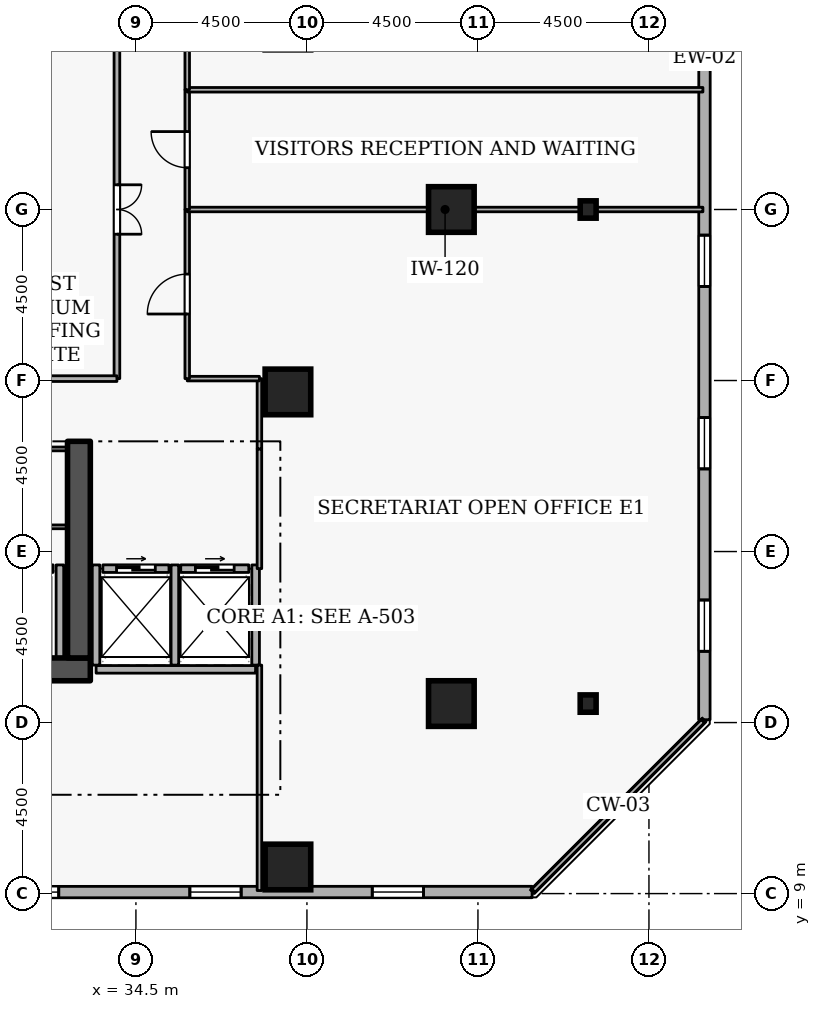
"""IFC4 building model, lengths in metres.
Left out: names, types, materials, properties, quantities, classifications, styles, units other than length and angle.
Written with IfcOpenShell. Run it as: python <this file> out.ifc"""

import sys

from ifc_helpers import new_model, si_unit, direction, frame, frame_2d, origin, origin_2d, place, context, subcontext, project, spatial, rectangle, i_section, extrude, element, fill, save


model = new_model("IFC4")
c1 = context("Model", 3, precision=1e-05, world=origin(), true_north=direction((0.0, 1.0)))
c2 = subcontext(c1, "Body", "Model", "MODEL_VIEW")
j1 = project(units=[si_unit("LENGTHUNIT", "METRE"), si_unit("PLANEANGLEUNIT", "RADIAN")], contexts=[c1])
p1 = place(None, origin())
s1 = spatial("IfcSite", under=j1, at=p1, CompositionType="ELEMENT")
p2 = place(p1, origin())
s2 = spatial("IfcBuilding", under=s1, at=p2, CompositionType="ELEMENT")
p3 = place(p2, frame((0.0, 0.0, 94.5)))
s3 = spatial("IfcBuildingStorey", under=s2, at=p3, CompositionType="ELEMENT", Elevation=94.5)
p4 = place(p3, frame((17.7, 14.9, 0.0), z_axis=(0.0, 0.0, 1.0), x_axis=(1.0, 0.0, 0.0)))
e1 = element("IfcWall", 1, at=p4, inside=s3, PredefinedType="SHEAR", context=c2, shape_type="SweptSolid", body=[
    extrude(rectangle(XDim=15.6, YDim=0.6, at=frame_2d((7.8, 0.0))), origin(), (0.0, 0.0, 1.0), 3.6),
])
p5 = place(p3, frame((33.0, 15.2, 0.0), z_axis=(0.0, 0.0, 1.0), x_axis=(0.0, 1.0, 0.0)))
e2 = element("IfcWall", 2, at=p5, inside=s3, PredefinedType="SHEAR", context=c2, shape_type="SweptSolid", body=[
    extrude(rectangle(XDim=5.7, YDim=0.6, at=frame_2d((2.85, 0.0))), origin(), (0.0, 0.0, 1.0), 3.6),
])
for number, where, z_axis, x_axis in (
    (3, (38.5, 9.7, 0.0), (0.0, 0.0, 1.0), (1.0, 0.0, 0.0)),
    (4, (42.8, 14.0, 0.0), (0.0, 0.0, 1.0), (1.0, 0.0, 0.0)),
    (5, (42.8, 27.0, 0.0), (0.0, 0.0, 1.0), (1.0, 0.0, 0.0)),
    (6, (38.5, 22.2, 0.0), (0.0, 0.0, 1.0), (1.0, 0.0, 0.0)),
):
    element("IfcColumn", number, at=place(p3, frame(where, z_axis=z_axis, x_axis=x_axis)), inside=s3, PredefinedType="COLUMN", context=c2, shape_type="SweptSolid", body=[
        extrude(rectangle(XDim=1.2, YDim=1.2, at=origin_2d()), origin(), (0.0, 0.0, 1.0), 3.6),
    ])
for number, where, z_axis, x_axis in (
    (7, (46.4, 14.0, 0.0), (0.0, 0.0, 1.0), (1.0, 0.0, 0.0)),
    (8, (46.4, 27.0, 0.0), (0.0, 0.0, 1.0), (1.0, 0.0, 0.0)),
):
    element("IfcColumn", number, at=place(p3, frame(where, z_axis=z_axis, x_axis=x_axis)), inside=s3, PredefinedType="COLUMN", context=c2, shape_type="SweptSolid", body=[
        extrude(i_section(OverallWidth=0.418, OverallDepth=0.456, WebThickness=0.042, FlangeThickness=0.067, FilletRadius=0.015, at=origin_2d()), origin(), (0.0, 0.0, 1.0), 3.6),
    ])
p6 = place(p3, frame((10.119, 9.035, 0.0), z_axis=(0.0, 0.0, 1.0), x_axis=(0.999999983371, 0.000182370391, 0.0)))
e9 = element("IfcWall", 9, at=p6, inside=s3, PredefinedType="STANDARD", context=c2, shape_type="SweptSolid", body=[
    extrude(rectangle(XDim=34.806, YDim=0.3, at=frame_2d((17.403, 0.0))), origin(), (0.0, 0.0, 1.0), 2.22),
])
p7 = place(p6, frame((6.6, 0.0, 0.72)))
e10 = element("IfcOpeningElement", 10, at=p7, cuts=e9, PredefinedType="OPENING", context=c2, shape_type="SweptSolid", body=[
    extrude(rectangle(XDim=1.35, YDim=1.05, at=frame_2d((0.675, 0.525))), frame((0.0, 0.16, 0.0), z_axis=(0.0, -1.0, 0.0), x_axis=(1.0, 0.0, 0.0)), (0.0, 0.0, 1.0), 0.32),
])
p8 = place(p6, frame((11.4, 0.0, 0.72)))
e11 = element("IfcOpeningElement", 11, at=p8, cuts=e9, PredefinedType="OPENING", context=c2, shape_type="SweptSolid", body=[
    extrude(rectangle(XDim=1.35, YDim=1.05, at=frame_2d((0.675, 0.525))), frame((0.0, 0.16, 0.0), z_axis=(0.0, -1.0, 0.0), x_axis=(1.0, 0.0, 0.0)), (0.0, 0.0, 1.0), 0.32),
])
p9 = place(p6, frame((21.0, 0.0, 0.72)))
e12 = element("IfcOpeningElement", 12, at=p9, cuts=e9, PredefinedType="OPENING", context=c2, shape_type="SweptSolid", body=[
    extrude(rectangle(XDim=1.35, YDim=1.05, at=frame_2d((0.675, 0.525))), frame((0.0, 0.16, 0.0), z_axis=(0.0, -1.0, 0.0), x_axis=(1.0, 0.0, 0.0)), (0.0, 0.0, 1.0), 0.32),
])
p10 = place(p6, frame((25.8, 0.0, 0.72)))
e13 = element("IfcOpeningElement", 13, at=p10, cuts=e9, PredefinedType="OPENING", context=c2, shape_type="SweptSolid", body=[
    extrude(rectangle(XDim=1.35, YDim=1.05, at=frame_2d((0.675, 0.525))), frame((0.0, 0.16, 0.0), z_axis=(0.0, -1.0, 0.0), x_axis=(1.0, 0.0, 0.0)), (0.0, 0.0, 1.0), 0.32),
])
p11 = place(p6, frame((30.6, 0.0, 0.72)))
e14 = element("IfcOpeningElement", 14, at=p11, cuts=e9, PredefinedType="OPENING", context=c2, shape_type="SweptSolid", body=[
    extrude(rectangle(XDim=1.35, YDim=1.05, at=frame_2d((0.675, 0.525))), frame((0.0, 0.16, 0.0), z_axis=(0.0, -1.0, 0.0), x_axis=(1.0, 0.0, 0.0)), (0.0, 0.0, 1.0), 0.32),
])
p12 = place(p3, frame((49.458, 13.575, 0.0), z_axis=(0.0, 0.0, 1.0), x_axis=(0.000182370391, 0.999999983371, 0.0)))
e15 = element("IfcWall", 15, at=p12, inside=s3, PredefinedType="STANDARD", context=c2, shape_type="SweptSolid", body=[
    extrude(rectangle(XDim=34.806, YDim=0.3, at=frame_2d((17.403, 0.0))), origin(), (0.0, 0.0, 1.0), 2.22),
])
p13 = place(p12, frame((1.8, 0.0, 0.72)))
e16 = element("IfcOpeningElement", 16, at=p13, cuts=e15, PredefinedType="OPENING", context=c2, shape_type="SweptSolid", body=[
    extrude(rectangle(XDim=1.35, YDim=1.05, at=frame_2d((0.675, 0.525))), frame((0.0, 0.16, 0.0), z_axis=(0.0, -1.0, 0.0), x_axis=(1.0, 0.0, 0.0)), (0.0, 0.0, 1.0), 0.32),
])
p14 = place(p12, frame((6.6, 0.0, 0.72)))
e17 = element("IfcOpeningElement", 17, at=p14, cuts=e15, PredefinedType="OPENING", context=c2, shape_type="SweptSolid", body=[
    extrude(rectangle(XDim=1.35, YDim=1.05, at=frame_2d((0.675, 0.525))), frame((0.0, 0.16, 0.0), z_axis=(0.0, -1.0, 0.0), x_axis=(1.0, 0.0, 0.0)), (0.0, 0.0, 1.0), 0.32),
])
p15 = place(p12, frame((11.4, 0.0, 0.72)))
e18 = element("IfcOpeningElement", 18, at=p15, cuts=e15, PredefinedType="OPENING", context=c2, shape_type="SweptSolid", body=[
    extrude(rectangle(XDim=1.35, YDim=1.05, at=frame_2d((0.675, 0.525))), frame((0.0, 0.16, 0.0), z_axis=(0.0, -1.0, 0.0), x_axis=(1.0, 0.0, 0.0)), (0.0, 0.0, 1.0), 0.32),
])
p16 = place(p12, frame((21.0, 0.0, 0.72)))
e19 = element("IfcOpeningElement", 19, at=p16, cuts=e15, PredefinedType="OPENING", context=c2, shape_type="SweptSolid", body=[
    extrude(rectangle(XDim=1.35, YDim=1.05, at=frame_2d((0.675, 0.525))), frame((0.0, 0.16, 0.0), z_axis=(0.0, -1.0, 0.0), x_axis=(1.0, 0.0, 0.0)), (0.0, 0.0, 1.0), 0.32),
])
p17 = place(p12, frame((25.8, 0.0, 0.72)))
e20 = element("IfcOpeningElement", 20, at=p17, cuts=e15, PredefinedType="OPENING", context=c2, shape_type="SweptSolid", body=[
    extrude(rectangle(XDim=1.35, YDim=1.05, at=frame_2d((0.675, 0.525))), frame((0.0, 0.16, 0.0), z_axis=(0.0, -1.0, 0.0), x_axis=(1.0, 0.0, 0.0)), (0.0, 0.0, 1.0), 0.32),
])
p18 = place(p12, frame((30.6, 0.0, 0.72)))
e21 = element("IfcOpeningElement", 21, at=p18, cuts=e15, PredefinedType="OPENING", context=c2, shape_type="SweptSolid", body=[
    extrude(rectangle(XDim=1.35, YDim=1.05, at=frame_2d((0.675, 0.525))), frame((0.0, 0.16, 0.0), z_axis=(0.0, -1.0, 0.0), x_axis=(1.0, 0.0, 0.0)), (0.0, 0.0, 1.0), 0.32),
])
p19 = place(p3, frame((30.43, 17.55, 0.0), z_axis=(0.0, 0.0, 1.0), x_axis=(1.0, 0.0, 0.0)))
e22 = element("IfcWall", 22, at=p19, inside=s3, PredefinedType="STANDARD", context=c2, shape_type="SweptSolid", body=[
    extrude(rectangle(XDim=1.89, YDim=0.2, at=frame_2d((0.945, 0.0))), origin(), (0.0, 0.0, 1.0), 3.3),
])
p20 = place(p19, frame((0.435, 0.0, 0.0)))
e23 = element("IfcOpeningElement", 23, at=p20, cuts=e22, PredefinedType="OPENING", context=c2, shape_type="SweptSolid", body=[
    extrude(rectangle(XDim=1.02, YDim=2.06, at=frame_2d((0.51, 1.03))), frame((0.0, 0.11, 0.0), z_axis=(0.0, -1.0, 0.0), x_axis=(1.0, 0.0, 0.0)), (0.0, 0.0, 1.0), 0.22),
])
p21 = place(p3, frame((33.63, 17.55, 0.0), z_axis=(0.0, 0.0, 1.0), x_axis=(1.0, 0.0, 0.0)))
e24 = element("IfcWall", 24, at=p21, inside=s3, PredefinedType="STANDARD", context=c2, shape_type="SweptSolid", body=[
    extrude(rectangle(XDim=1.74, YDim=0.2, at=frame_2d((0.87, 0.0))), origin(), (0.0, 0.0, 1.0), 3.3),
])
p22 = place(p21, frame((0.36, 0.0, 0.0)))
e25 = element("IfcOpeningElement", 25, at=p22, cuts=e24, PredefinedType="OPENING", context=c2, shape_type="SweptSolid", body=[
    extrude(rectangle(XDim=1.02, YDim=2.06, at=frame_2d((0.51, 1.03))), frame((0.0, 0.11, 0.0), z_axis=(0.0, -1.0, 0.0), x_axis=(1.0, 0.0, 0.0)), (0.0, 0.0, 1.0), 0.22),
])
p23 = place(p3, frame((35.68, 17.55, 0.0), z_axis=(0.0, 0.0, 1.0), x_axis=(1.0, 0.0, 0.0)))
e26 = element("IfcWall", 26, at=p23, inside=s3, PredefinedType="STANDARD", context=c2, shape_type="SweptSolid", body=[
    extrude(rectangle(XDim=1.79, YDim=0.2, at=frame_2d((0.895, 0.0))), origin(), (0.0, 0.0, 1.0), 3.3),
])
p24 = place(p23, frame((0.385, 0.0, 0.0)))
e27 = element("IfcOpeningElement", 27, at=p24, cuts=e26, PredefinedType="OPENING", context=c2, shape_type="SweptSolid", body=[
    extrude(rectangle(XDim=1.02, YDim=2.06, at=frame_2d((0.51, 1.03))), frame((0.0, 0.11, 0.0), z_axis=(0.0, -1.0, 0.0), x_axis=(1.0, 0.0, 0.0)), (0.0, 0.0, 1.0), 0.22),
])
p25 = place(p3, frame((32.5, 15.212, 0.0), z_axis=(0.0, 0.0, 1.0), x_axis=(0.0, 1.0, 0.0)))
e28 = element("IfcWall", 28, at=p25, inside=s3, PredefinedType="STANDARD", context=c2, shape_type="SweptSolid", body=[
    extrude(rectangle(XDim=2.436, YDim=0.2, at=frame_2d((1.218, 0.0))), origin(), (0.0, 0.0, 1.0), 3.3),
])
p26 = place(p3, frame((33.452, 14.9, 0.0), z_axis=(0.0, 0.0, 1.0), x_axis=(1.0, 0.0, 0.0)))
e29 = element("IfcWall", 29, at=p26, inside=s3, PredefinedType="STANDARD", context=c2, shape_type="SweptSolid", body=[
    extrude(rectangle(XDim=4.196, YDim=0.2, at=frame_2d((2.098, 0.0))), origin(), (0.0, 0.0, 1.0), 3.3),
])
for number, where, z_axis, x_axis in (
    (30, (35.525, 15.012, 0.0), (0.0, 0.0, 1.0), (0.0, 1.0, 0.0)),
    (31, (33.45, 15.012, 0.0), (0.0, 0.0, 1.0), (0.0, 1.0, 0.0)),
    (32, (37.65, 15.012, 0.0), (0.0, 0.0, 1.0), (0.0, 1.0, 0.0)),
):
    element("IfcWall", number, at=place(p3, frame(where, z_axis=z_axis, x_axis=x_axis)), inside=s3, PredefinedType="STANDARD", context=c2, shape_type="SweptSolid", body=[
        extrude(rectangle(XDim=2.636, YDim=0.2, at=frame_2d((1.318, 0.0))), origin(), (0.0, 0.0, 1.0), 3.3),
    ])
p27 = place(p3, frame((32.7, 18.65, 0.0), z_axis=(0.0, 0.0, 1.0), x_axis=(-1.0, 0.0, 0.0)))
e33 = element("IfcWall", 33, at=p27, inside=s3, PredefinedType="PARTITIONING", context=c2, shape_type="SweptSolid", body=[
    extrude(rectangle(XDim=2.15, YDim=0.1, at=frame_2d((1.075, 0.0))), origin(), (0.0, 0.0, 1.0), 3.3),
])
p28 = place(p3, frame((30.55, 20.7, 0.0), z_axis=(0.0, 0.0, 1.0), x_axis=(1.0, 0.0, 0.0)))
e34 = element("IfcWall", 34, at=p28, inside=s3, PredefinedType="PARTITIONING", context=c2, shape_type="SweptSolid", body=[
    extrude(rectangle(XDim=2.15, YDim=0.1, at=frame_2d((1.075, 0.0))), origin(), (0.0, 0.0, 1.0), 3.3),
])
p29 = place(p28, frame((0.6, 0.0, 0.0)))
e35 = element("IfcOpeningElement", 35, at=p29, cuts=e34, PredefinedType="OPENING", context=c2, shape_type="SweptSolid", body=[
    extrude(rectangle(XDim=0.95, YDim=2.1, at=frame_2d((0.475, 1.05))), frame((0.0, 0.06, 0.0), z_axis=(0.0, -1.0, 0.0), x_axis=(1.0, 0.0, 0.0)), (0.0, 0.0, 1.0), 0.12),
])
p30 = place(p3, frame((37.75, 17.55, 0.0), z_axis=(0.0, 0.0, 1.0), x_axis=(0.0, 1.0, 0.0)))
e36 = element("IfcWall", 36, at=p30, inside=s3, PredefinedType="PARTITIONING", context=c2, shape_type="SweptSolid", body=[
    extrude(rectangle(XDim=3.15, YDim=0.12, at=frame_2d((1.575, 0.0))), origin(), (0.0, 0.0, 1.0), 3.3),
])
p31 = place(p3, frame((37.75, 20.7, 0.0), z_axis=(0.0, 0.0, 1.0), x_axis=(0.0, 1.0, 0.0)))
e37 = element("IfcWall", 37, at=p31, inside=s3, PredefinedType="PARTITIONING", context=c2, shape_type="SweptSolid", body=[
    extrude(rectangle(XDim=1.85, YDim=0.12, at=frame_2d((0.925, 0.0))), origin(), (0.0, 0.0, 1.0), 3.3),
])
p32 = place(p3, frame((37.75, 22.55, 0.0), z_axis=(0.0, 0.0, 1.0), x_axis=(-1.0, 0.0, 0.0)))
e38 = element("IfcWall", 38, at=p32, inside=s3, PredefinedType="PARTITIONING", context=c2, shape_type="SweptSolid", body=[
    extrude(rectangle(XDim=1.9, YDim=0.12, at=frame_2d((0.95, 0.0))), origin(), (0.0, 0.0, 1.0), 3.3),
])
p33 = place(p3, frame((35.85, 22.55, 0.0), z_axis=(0.0, 0.0, 1.0), x_axis=(0.0, 1.0, 0.0)))
e39 = element("IfcWall", 39, at=p33, inside=s3, PredefinedType="PARTITIONING", context=c2, shape_type="SweptSolid", body=[
    extrude(rectangle(XDim=4.45, YDim=0.12, at=frame_2d((2.225, 0.0))), origin(), (0.0, 0.0, 1.0), 3.3),
])
p34 = place(p33, frame((1.7, 0.0, 0.0)))
e40 = element("IfcOpeningElement", 40, at=p34, cuts=e39, PredefinedType="OPENING", context=c2, shape_type="SweptSolid", body=[
    extrude(rectangle(XDim=1.05, YDim=2.1, at=frame_2d((0.525, 1.05))), frame((0.0, 0.07, 0.0), z_axis=(0.0, -1.0, 0.0), x_axis=(1.0, 0.0, 0.0)), (0.0, 0.0, 1.0), 0.14),
])
p35 = place(p3, frame((35.85, 27.0, 0.0), z_axis=(0.0, 0.0, 1.0), x_axis=(1.0, 0.0, 0.0)))
e41 = element("IfcWall", 41, at=p35, inside=s3, PredefinedType="PARTITIONING", context=c2, shape_type="SweptSolid", body=[
    extrude(rectangle(XDim=13.57, YDim=0.12, at=frame_2d((6.785, 0.0))), origin(), (0.0, 0.0, 1.0), 2.892),
])
p36 = place(p3, frame((49.42, 13.539, 0.0), z_axis=(0.0, 0.0, 1.0), x_axis=(-0.707106781187, -0.707106781187, 0.0)))
e42 = element("IfcWall", 42, at=p36, inside=s3, PredefinedType="PARTITIONING", context=c2, shape_type="SweptSolid", body=[
    extrude(rectangle(XDim=6.305, YDim=0.12, at=frame_2d((3.153, 0.0))), origin(), (0.0, 0.0, 1.0), 3.3),
])
p37 = place(p3, frame((37.75, 9.08, 0.0), z_axis=(0.0, 0.0, 1.0), x_axis=(0.0, 1.0, 0.0)))
e43 = element("IfcWall", 43, at=p37, inside=s3, PredefinedType="PARTITIONING", context=c2, shape_type="SweptSolid", body=[
    extrude(rectangle(XDim=5.932, YDim=0.12, at=frame_2d((2.966, 0.0))), origin(), (0.0, 0.0, 1.0), 3.3),
])
p38 = place(p3, frame((35.85, 27.0, 0.0), z_axis=(0.0, 0.0, 1.0), x_axis=(0.0, 1.0, 0.0)))
e44 = element("IfcWall", 44, at=p38, inside=s3, PredefinedType="PARTITIONING", context=c2, shape_type="SweptSolid", body=[
    extrude(rectangle(XDim=3.15, YDim=0.12, at=frame_2d((1.575, 0.0))), origin(), (0.0, 0.0, 1.0), 3.3),
])
p39 = place(p38, frame((1.1, 0.0, 0.0)))
e45 = element("IfcOpeningElement", 45, at=p39, cuts=e44, PredefinedType="OPENING", context=c2, shape_type="SweptSolid", body=[
    extrude(rectangle(XDim=0.95, YDim=2.1, at=frame_2d((0.475, 1.05))), frame((0.0, 0.07, 0.0), z_axis=(0.0, -1.0, 0.0), x_axis=(1.0, 0.0, 0.0)), (0.0, 0.0, 1.0), 0.14),
])
p40 = place(p3, frame((35.85, 30.15, 0.0), z_axis=(0.0, 0.0, 1.0), x_axis=(1.0, 0.0, 0.0)))
e46 = element("IfcWall", 46, at=p40, inside=s3, PredefinedType="PARTITIONING", context=c2, shape_type="SweptSolid", body=[
    extrude(rectangle(XDim=13.57, YDim=0.12, at=frame_2d((6.785, 0.0))), origin(), (0.0, 0.0, 1.0), 3.3),
])
p41 = place(p3, frame((35.85, 30.15, 0.0), z_axis=(0.0, 0.0, 1.0), x_axis=(0.0, 1.0, 0.0)))
e47 = element("IfcWall", 47, at=p41, inside=s3, PredefinedType="PARTITIONING", context=c2, shape_type="SweptSolid", body=[
    extrude(rectangle(XDim=1.3, YDim=0.12, at=frame_2d((0.65, 0.0))), origin(), (0.0, 0.0, 1.0), 3.3),
])
p42 = place(p3, frame((34.0, 31.45, 0.0), z_axis=(0.0, 0.0, 1.0), x_axis=(0.0, -1.0, 0.0)))
e48 = element("IfcWall", 48, at=p42, inside=s3, PredefinedType="PARTITIONING", context=c2, shape_type="SweptSolid", body=[
    extrude(rectangle(XDim=8.9, YDim=0.15, at=frame_2d((4.45, 0.0))), origin(), (0.0, 0.0, 1.0), 3.3),
])
p43 = place(p42, frame((3.8, 0.0, 0.0)))
e49 = element("IfcOpeningElement", 49, at=p43, cuts=e48, PredefinedType="OPENING", context=c2, shape_type="SweptSolid", body=[
    extrude(rectangle(XDim=1.3, YDim=2.12, at=frame_2d((0.65, 1.06))), frame((0.0, 0.085, 0.0), z_axis=(0.0, -1.0, 0.0), x_axis=(1.0, 0.0, 0.0)), (0.0, 0.0, 1.0), 0.17),
])
p44 = place(p3, frame((34.0, 22.55, 0.0), z_axis=(0.0, 0.0, 1.0), x_axis=(-1.0, 0.0, 0.0)))
e50 = element("IfcWall", 50, at=p44, inside=s3, PredefinedType="PARTITIONING", context=c2, shape_type="SweptSolid", body=[
    extrude(rectangle(XDim=3.3, YDim=0.15, at=frame_2d((1.65, 0.0))), origin(), (0.0, 0.0, 1.0), 3.3),
])
p45 = place(p9, origin())
e51 = element("IfcWindow", 51, at=p45, inside=s3, PartitioningType="SINGLE_PANEL", PredefinedType="WINDOW", context=c2, shape_type="SweptSolid", body=[
    extrude(rectangle(XDim=1.35, YDim=1.05, at=frame_2d((0.675, 0.525))), frame((0.0, 0.03, 0.0), z_axis=(0.0, -1.0, 0.0), x_axis=(1.0, 0.0, 0.0)), (0.0, 0.0, 1.0), 0.06),
])
fill(e12, e51)
p46 = place(p10, origin())
e52 = element("IfcWindow", 52, at=p46, inside=s3, PartitioningType="SINGLE_PANEL", PredefinedType="WINDOW", context=c2, shape_type="SweptSolid", body=[
    extrude(rectangle(XDim=1.35, YDim=1.05, at=frame_2d((0.675, 0.525))), frame((0.0, 0.03, 0.0), z_axis=(0.0, -1.0, 0.0), x_axis=(1.0, 0.0, 0.0)), (0.0, 0.0, 1.0), 0.06),
])
fill(e13, e52)
p47 = place(p11, origin())
e53 = element("IfcWindow", 53, at=p47, inside=s3, PartitioningType="SINGLE_PANEL", PredefinedType="WINDOW", context=c2, shape_type="SweptSolid", body=[
    extrude(rectangle(XDim=1.35, YDim=1.05, at=frame_2d((0.675, 0.525))), frame((0.0, 0.03, 0.0), z_axis=(0.0, -1.0, 0.0), x_axis=(1.0, 0.0, 0.0)), (0.0, 0.0, 1.0), 0.06),
])
fill(e14, e53)
p48 = place(p13, origin())
e54 = element("IfcWindow", 54, at=p48, inside=s3, PartitioningType="SINGLE_PANEL", PredefinedType="WINDOW", context=c2, shape_type="SweptSolid", body=[
    extrude(rectangle(XDim=1.35, YDim=1.05, at=frame_2d((0.675, 0.525))), frame((0.0, 0.03, 0.0), z_axis=(0.0, -1.0, 0.0), x_axis=(1.0, 0.0, 0.0)), (0.0, 0.0, 1.0), 0.06),
])
fill(e16, e54)
p49 = place(p14, origin())
e55 = element("IfcWindow", 55, at=p49, inside=s3, PartitioningType="SINGLE_PANEL", PredefinedType="WINDOW", context=c2, shape_type="SweptSolid", body=[
    extrude(rectangle(XDim=1.35, YDim=1.05, at=frame_2d((0.675, 0.525))), frame((0.0, 0.03, 0.0), z_axis=(0.0, -1.0, 0.0), x_axis=(1.0, 0.0, 0.0)), (0.0, 0.0, 1.0), 0.06),
])
fill(e17, e55)
p50 = place(p15, origin())
e56 = element("IfcWindow", 56, at=p50, inside=s3, PartitioningType="SINGLE_PANEL", PredefinedType="WINDOW", context=c2, shape_type="SweptSolid", body=[
    extrude(rectangle(XDim=1.35, YDim=1.05, at=frame_2d((0.675, 0.525))), frame((0.0, 0.03, 0.0), z_axis=(0.0, -1.0, 0.0), x_axis=(1.0, 0.0, 0.0)), (0.0, 0.0, 1.0), 0.06),
])
fill(e18, e56)
p51 = place(p22, origin())
e57 = element("IfcDoor", 57, at=p51, inside=s3, OperationType="SLIDING_TO_LEFT", PredefinedType="DOOR", context=c2, shape_type="SweptSolid", body=[
    extrude(rectangle(XDim=1.02, YDim=2.06, at=frame_2d((0.51, 1.03))), frame((0.0, 0.025, 0.0), z_axis=(0.0, -1.0, 0.0), x_axis=(1.0, 0.0, 0.0)), (0.0, 0.0, 1.0), 0.05),
])
fill(e25, e57)
p52 = place(p24, origin())
e58 = element("IfcDoor", 58, at=p52, inside=s3, OperationType="SLIDING_TO_LEFT", PredefinedType="DOOR", context=c2, shape_type="SweptSolid", body=[
    extrude(rectangle(XDim=1.02, YDim=2.06, at=frame_2d((0.51, 1.03))), frame((0.0, 0.025, 0.0), z_axis=(0.0, -1.0, 0.0), x_axis=(1.0, 0.0, 0.0)), (0.0, 0.0, 1.0), 0.05),
])
fill(e27, e58)
p53 = place(p34, origin())
e59 = element("IfcDoor", 59, at=p53, inside=s3, OperationType="SINGLE_SWING_LEFT", PredefinedType="DOOR", context=c2, shape_type="SweptSolid", body=[
    extrude(rectangle(XDim=1.05, YDim=2.1, at=frame_2d((0.525, 1.05))), frame((0.0, 0.025, 0.0), z_axis=(0.0, -1.0, 0.0), x_axis=(1.0, 0.0, 0.0)), (0.0, 0.0, 1.0), 0.05),
])
fill(e40, e59)
p54 = place(p39, origin())
e60 = element("IfcDoor", 60, at=p54, inside=s3, OperationType="SINGLE_SWING_RIGHT", PredefinedType="DOOR", context=c2, shape_type="SweptSolid", body=[
    extrude(rectangle(XDim=0.95, YDim=2.1, at=frame_2d((0.475, 1.05))), frame((0.0, 0.025, 0.0), z_axis=(0.0, -1.0, 0.0), x_axis=(1.0, 0.0, 0.0)), (0.0, 0.0, 1.0), 0.05),
])
fill(e45, e60)
p55 = place(p43, origin())
e61 = element("IfcDoor", 61, at=p55, inside=s3, OperationType="DOUBLE_DOOR_SINGLE_SWING", PredefinedType="DOOR", context=c2, shape_type="SweptSolid", body=[
    extrude(rectangle(XDim=1.3, YDim=2.12, at=frame_2d((0.65, 1.06))), frame((0.0, 0.025, 0.0), z_axis=(0.0, -1.0, 0.0), x_axis=(1.0, 0.0, 0.0)), (0.0, 0.0, 1.0), 0.05),
])
fill(e49, e61)
save(model, sys.argv[1])
